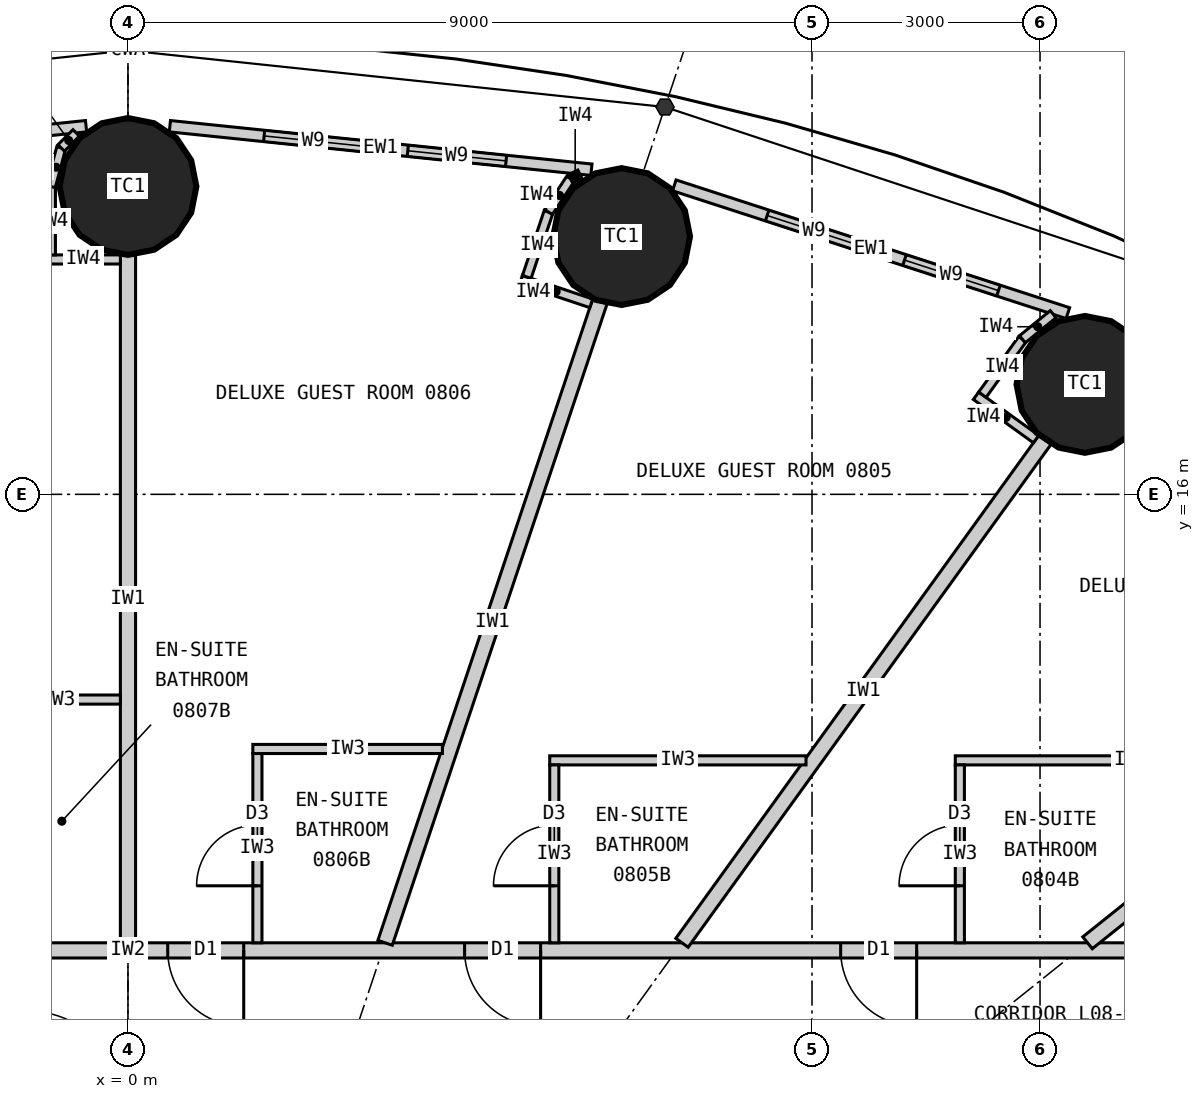
"""IFC4 building model, lengths in metres.
Left out: names, types, materials, properties, quantities, classifications, styles, units other than length and angle.
Written with IfcOpenShell. Run it as: python <this file> out.ifc"""

import sys

from ifc_helpers import new_model, si_unit, direction, frame, frame_2d, origin, origin_2d, place, context, subcontext, project, spatial, rectangle, circle, extrude, element, fill, save


model = new_model("IFC4")
c1 = context("Model", 3, precision=1e-05, world=origin(), true_north=direction((0.0, 1.0)))
c2 = subcontext(c1, "Body", "Model", "MODEL_VIEW")
j1 = project(units=[si_unit("LENGTHUNIT", "METRE"), si_unit("PLANEANGLEUNIT", "RADIAN")], contexts=[c1])
p1 = place(None, origin())
s1 = spatial("IfcSite", under=j1, at=p1, CompositionType="ELEMENT")
p2 = place(p1, origin())
s2 = spatial("IfcBuilding", under=s1, at=p2, CompositionType="ELEMENT")
p3 = place(p2, frame((0.0, 0.0, 39.3)))
s3 = spatial("IfcBuildingStorey", under=s2, at=p3, CompositionType="ELEMENT", Elevation=39.3)
for number, where, z_axis, x_axis in (
    (1, (12.591, 17.447, 0.0), (0.0, 0.0, 1.0), (1.0, 0.0, 0.0)),
    (2, (6.495, 19.391, 0.0), (0.0, 0.0, 1.0), (1.0, 0.0, 0.0)),
    (3, (0.0, 20.05, 0.0), (0.0, 0.0, 1.0), (1.0, 0.0, 0.0)),
):
    element("IfcColumn", number, at=place(p3, frame(where, z_axis=z_axis, x_axis=x_axis)), inside=s3, PredefinedType="COLUMN", context=c2, shape_type="SweptSolid", body=[
        extrude(circle(Radius=0.9, at=origin_2d()), origin(), (0.0, 0.0, 1.0), 3.3),
    ])
p4 = place(p3, frame((12.366, 18.384, 0.0), z_axis=(0.0, 0.0, 1.0), x_axis=(-0.951138486029, 0.308764603532, 0.0)))
e4 = element("IfcWall", 4, at=p4, inside=s3, PredefinedType="ELEMENTEDWALL", context=c2, shape_type="SweptSolid", body=[
    extrude(rectangle(XDim=5.444, YDim=0.15, at=frame_2d((2.722, 0.0))), origin(), (0.0, 0.0, 1.0), 3.12),
])
p5 = place(p4, frame((0.96, 0.0, 0.9)))
e5 = element("IfcOpeningElement", 5, at=p5, cuts=e4, PredefinedType="OPENING", context=c2, shape_type="SweptSolid", body=[
    extrude(rectangle(XDim=1.3, YDim=1.9, at=frame_2d((0.65, 0.95))), frame((0.0, 0.085, 0.0), z_axis=(0.0, -1.0, 0.0), x_axis=(1.0, 0.0, 0.0)), (0.0, 0.0, 1.0), 0.17),
])
p6 = place(p4, frame((2.86, 0.0, 0.9)))
e6 = element("IfcOpeningElement", 6, at=p6, cuts=e4, PredefinedType="OPENING", context=c2, shape_type="SweptSolid", body=[
    extrude(rectangle(XDim=1.3, YDim=1.9, at=frame_2d((0.65, 0.95))), frame((0.0, 0.085, 0.0), z_axis=(0.0, -1.0, 0.0), x_axis=(1.0, 0.0, 0.0)), (0.0, 0.0, 1.0), 0.17),
])
p7 = place(p3, frame((6.098, 20.271, 0.0), z_axis=(0.0, 0.0, 1.0), x_axis=(-0.994723735084, 0.102589915983, 0.0)))
e7 = element("IfcWall", 7, at=p7, inside=s3, PredefinedType="ELEMENTEDWALL", context=c2, shape_type="SweptSolid", body=[
    extrude(rectangle(XDim=5.576, YDim=0.15, at=frame_2d((2.788, 0.0))), origin(), (0.0, 0.0, 1.0), 3.12),
])
p8 = place(p7, frame((1.129, 0.0, 0.9)))
e8 = element("IfcOpeningElement", 8, at=p8, cuts=e7, PredefinedType="OPENING", context=c2, shape_type="SweptSolid", body=[
    extrude(rectangle(XDim=1.3, YDim=1.9, at=frame_2d((0.65, 0.95))), frame((0.0, 0.085, 0.0), z_axis=(0.0, -1.0, 0.0), x_axis=(1.0, 0.0, 0.0)), (0.0, 0.0, 1.0), 0.17),
])
p9 = place(p7, frame((3.029, 0.0, 0.9)))
e9 = element("IfcOpeningElement", 9, at=p9, cuts=e7, PredefinedType="OPENING", context=c2, shape_type="SweptSolid", body=[
    extrude(rectangle(XDim=1.3, YDim=1.9, at=frame_2d((0.65, 0.95))), frame((0.0, 0.085, 0.0), z_axis=(0.0, -1.0, 0.0), x_axis=(1.0, 0.0, 0.0)), (0.0, 0.0, 1.0), 0.17),
])
p10 = place(p3, frame((-0.551, 20.843, 0.0), z_axis=(0.0, 0.0, 1.0), x_axis=(-0.994723735084, -0.102589915983, 0.0)))
e10 = element("IfcWall", 10, at=p10, inside=s3, PredefinedType="ELEMENTEDWALL", context=c2, shape_type="SweptSolid", body=[
    extrude(rectangle(XDim=5.576, YDim=0.15, at=frame_2d((2.788, 0.0))), origin(), (0.0, 0.0, 1.0), 3.12),
])
p11 = place(p10, frame((1.247, 0.0, 0.9)))
e11 = element("IfcOpeningElement", 11, at=p11, cuts=e10, PredefinedType="OPENING", context=c2, shape_type="SweptSolid", body=[
    extrude(rectangle(XDim=1.3, YDim=1.9, at=frame_2d((0.65, 0.95))), frame((0.0, 0.085, 0.0), z_axis=(0.0, -1.0, 0.0), x_axis=(1.0, 0.0, 0.0)), (0.0, 0.0, 1.0), 0.17),
])
p12 = place(p10, frame((3.147, 0.0, 0.9)))
e12 = element("IfcOpeningElement", 12, at=p12, cuts=e10, PredefinedType="OPENING", context=c2, shape_type="SweptSolid", body=[
    extrude(rectangle(XDim=1.3, YDim=1.9, at=frame_2d((0.65, 0.95))), frame((0.0, 0.085, 0.0), z_axis=(0.0, -1.0, 0.0), x_axis=(1.0, 0.0, 0.0)), (0.0, 0.0, 1.0), 0.17),
])
p13 = place(p3, frame((-14.1, 10.0, 0.0), z_axis=(0.0, 0.0, 1.0), x_axis=(1.0, 0.0, 0.0)))
e13 = element("IfcWall", 13, at=p13, inside=s3, PredefinedType="PARTITIONING", context=c2, shape_type="SweptSolid", body=[
    extrude(rectangle(XDim=28.2, YDim=0.2, at=frame_2d((14.1, 0.0))), origin(), (0.0, 0.0, 1.0), 3.12),
])
p14 = place(p13, frame((23.477, 0.0, 0.0)))
e14 = element("IfcOpeningElement", 14, at=p14, cuts=e13, PredefinedType="OPENING", context=c2, shape_type="SweptSolid", body=[
    extrude(rectangle(XDim=1.0, YDim=2.2, at=frame_2d((0.5, 1.1))), frame((0.0, 0.11, 0.0), z_axis=(0.0, -1.0, 0.0), x_axis=(1.0, 0.0, 0.0)), (0.0, 0.0, 1.0), 0.22),
])
p15 = place(p13, frame((18.529, 0.0, 0.0)))
e15 = element("IfcOpeningElement", 15, at=p15, cuts=e13, PredefinedType="OPENING", context=c2, shape_type="SweptSolid", body=[
    extrude(rectangle(XDim=1.0, YDim=2.2, at=frame_2d((0.5, 1.1))), frame((0.0, 0.11, 0.0), z_axis=(0.0, -1.0, 0.0), x_axis=(1.0, 0.0, 0.0)), (0.0, 0.0, 1.0), 0.22),
])
p16 = place(p13, frame((14.623, 0.0, 0.0)))
e16 = element("IfcOpeningElement", 16, at=p16, cuts=e13, PredefinedType="OPENING", context=c2, shape_type="SweptSolid", body=[
    extrude(rectangle(XDim=1.0, YDim=2.2, at=frame_2d((0.5, 1.1))), frame((0.0, 0.11, 0.0), z_axis=(0.0, -1.0, 0.0), x_axis=(1.0, 0.0, 0.0)), (0.0, 0.0, 1.0), 0.22),
])
p17 = place(p13, frame((11.252, 0.0, 0.0)))
e17 = element("IfcOpeningElement", 17, at=p17, cuts=e13, PredefinedType="OPENING", context=c2, shape_type="SweptSolid", body=[
    extrude(rectangle(XDim=1.0, YDim=2.1, at=frame_2d((0.5, 1.05))), frame((0.0, 0.11, 0.0), z_axis=(0.0, -1.0, 0.0), x_axis=(1.0, 0.0, 0.0)), (0.0, 0.0, 1.0), 0.22),
])
p18 = place(p13, frame((8.671, 0.0, 0.0)))
e18 = element("IfcOpeningElement", 18, at=p18, cuts=e13, PredefinedType="OPENING", context=c2, shape_type="SweptSolid", body=[
    extrude(rectangle(XDim=1.0, YDim=2.2, at=frame_2d((0.5, 1.1))), frame((0.0, 0.11, 0.0), z_axis=(0.0, -1.0, 0.0), x_axis=(1.0, 0.0, 0.0)), (0.0, 0.0, 1.0), 0.22),
])
p19 = place(p13, frame((1.616, 0.0, 0.0)))
e19 = element("IfcOpeningElement", 19, at=p19, cuts=e13, PredefinedType="OPENING", context=c2, shape_type="SweptSolid", body=[
    extrude(rectangle(XDim=1.0, YDim=2.2, at=frame_2d((0.5, 1.1))), frame((0.0, 0.11, 0.0), z_axis=(0.0, -1.0, 0.0), x_axis=(1.0, 0.0, 0.0)), (0.0, 0.0, 1.0), 0.22),
])
p20 = place(p3, frame((12.625, 10.1, 0.0), z_axis=(0.0, 0.0, 1.0), x_axis=(0.780872884676, 0.624689953479, 0.0)))
e20 = element("IfcWall", 20, at=p20, inside=s3, PredefinedType="PARTITIONING", context=c2, shape_type="SweptSolid", body=[
    extrude(rectangle(XDim=5.845, YDim=0.2, at=frame_2d((2.922, 0.0))), origin(), (0.0, 0.0, 1.0), 2.32),
])
p21 = place(p3, frame((7.289, 10.1, 0.0), z_axis=(0.0, 0.0, 1.0), x_axis=(0.585216319319, 0.810877216108, 0.0)))
e21 = element("IfcWall", 21, at=p21, inside=s3, PredefinedType="PARTITIONING", context=c2, shape_type="SweptSolid", body=[
    extrude(rectangle(XDim=8.16, YDim=0.2, at=frame_2d((4.08, 0.0))), origin(), (0.0, 0.0, 1.0), 2.32),
])
p22 = place(p3, frame((3.383, 10.1, 0.0), z_axis=(0.0, 0.0, 1.0), x_axis=(0.317593727596, 0.948226884344, 0.0)))
e22 = element("IfcWall", 22, at=p22, inside=s3, PredefinedType="PARTITIONING", context=c2, shape_type="SweptSolid", body=[
    extrude(rectangle(XDim=8.899, YDim=0.2, at=frame_2d((4.449, 0.0))), origin(), (0.0, 0.0, 1.0), 2.32),
])
p23 = place(p3, frame((0.0, 10.1, 0.0), z_axis=(0.0, 0.0, 1.0), x_axis=(0.0, 1.0, 0.0)))
e23 = element("IfcWall", 23, at=p23, inside=s3, PredefinedType="PARTITIONING", context=c2, shape_type="SweptSolid", body=[
    extrude(rectangle(XDim=9.05, YDim=0.2, at=frame_2d((4.525, 0.0))), origin(), (0.0, 0.0, 1.0), 2.32),
])
p24 = place(p3, frame((15.525, 12.5, 0.0), z_axis=(0.0, 0.0, 1.0), x_axis=(-1.0, 0.0, 0.0)))
e24 = element("IfcWall", 24, at=p24, inside=s3, PredefinedType="PARTITIONING", context=c2, shape_type="SweptSolid", body=[
    extrude(rectangle(XDim=4.64, YDim=0.12, at=frame_2d((2.32, 0.0))), origin(), (0.0, 0.0, 1.0), 3.12),
])
p25 = place(p3, frame((10.945, 10.1, 0.0), z_axis=(0.0, 0.0, 1.0), x_axis=(0.0, 1.0, 0.0)))
e25 = element("IfcWall", 25, at=p25, inside=s3, PredefinedType="PARTITIONING", context=c2, shape_type="SweptSolid", body=[
    extrude(rectangle(XDim=2.34, YDim=0.12, at=frame_2d((1.17, 0.0))), origin(), (0.0, 0.0, 1.0), 3.12),
])
p26 = place(p25, frame((0.75, 0.0, 0.0)))
e26 = element("IfcOpeningElement", 26, at=p26, cuts=e25, PredefinedType="OPENING", context=c2, shape_type="SweptSolid", body=[
    extrude(rectangle(XDim=0.8, YDim=2.1, at=frame_2d((0.4, 1.05))), frame((0.0, 0.07, 0.0), z_axis=(0.0, -1.0, 0.0), x_axis=(1.0, 0.0, 0.0)), (0.0, 0.0, 1.0), 0.14),
])
p27 = place(p3, frame((8.921, 12.5, 0.0), z_axis=(0.0, 0.0, 1.0), x_axis=(-1.0, 0.0, 0.0)))
e27 = element("IfcWall", 27, at=p27, inside=s3, PredefinedType="PARTITIONING", context=c2, shape_type="SweptSolid", body=[
    extrude(rectangle(XDim=3.372, YDim=0.12, at=frame_2d((1.686, 0.0))), origin(), (0.0, 0.0, 1.0), 3.12),
])
p28 = place(p3, frame((5.609, 10.1, 0.0), z_axis=(0.0, 0.0, 1.0), x_axis=(0.0, 1.0, 0.0)))
e28 = element("IfcWall", 28, at=p28, inside=s3, PredefinedType="PARTITIONING", context=c2, shape_type="SweptSolid", body=[
    extrude(rectangle(XDim=2.34, YDim=0.12, at=frame_2d((1.17, 0.0))), origin(), (0.0, 0.0, 1.0), 3.12),
])
p29 = place(p28, frame((0.75, 0.0, 0.0)))
e29 = element("IfcOpeningElement", 29, at=p29, cuts=e28, PredefinedType="OPENING", context=c2, shape_type="SweptSolid", body=[
    extrude(rectangle(XDim=0.8, YDim=2.1, at=frame_2d((0.4, 1.05))), frame((0.0, 0.07, 0.0), z_axis=(0.0, -1.0, 0.0), x_axis=(1.0, 0.0, 0.0)), (0.0, 0.0, 1.0), 0.14),
])
p30 = place(p3, frame((4.137, 12.65, 0.0), z_axis=(0.0, 0.0, 1.0), x_axis=(-1.0, 0.0, 0.0)))
e30 = element("IfcWall", 30, at=p30, inside=s3, PredefinedType="PARTITIONING", context=c2, shape_type="SweptSolid", body=[
    extrude(rectangle(XDim=2.494, YDim=0.12, at=frame_2d((1.247, 0.0))), origin(), (0.0, 0.0, 1.0), 3.12),
])
p31 = place(p3, frame((1.703, 10.1, 0.0), z_axis=(0.0, 0.0, 1.0), x_axis=(0.0, 1.0, 0.0)))
e31 = element("IfcWall", 31, at=p31, inside=s3, PredefinedType="PARTITIONING", context=c2, shape_type="SweptSolid", body=[
    extrude(rectangle(XDim=2.49, YDim=0.12, at=frame_2d((1.245, 0.0))), origin(), (0.0, 0.0, 1.0), 3.12),
])
p32 = place(p31, frame((0.75, 0.0, 0.0)))
e32 = element("IfcOpeningElement", 32, at=p32, cuts=e31, PredefinedType="OPENING", context=c2, shape_type="SweptSolid", body=[
    extrude(rectangle(XDim=0.8, YDim=2.1, at=frame_2d((0.4, 1.05))), frame((0.0, 0.07, 0.0), z_axis=(0.0, -1.0, 0.0), x_axis=(1.0, 0.0, 0.0)), (0.0, 0.0, 1.0), 0.14),
])
p33 = place(p3, frame((-0.1, 13.3, 0.0), z_axis=(0.0, 0.0, 1.0), x_axis=(-1.0, 0.0, 0.0)))
e33 = element("IfcWall", 33, at=p33, inside=s3, PredefinedType="PARTITIONING", context=c2, shape_type="SweptSolid", body=[
    extrude(rectangle(XDim=1.64, YDim=0.12, at=frame_2d((0.82, 0.0))), origin(), (0.0, 0.0, 1.0), 3.12),
])
p34 = place(p3, frame((11.948, 16.727, 0.0), z_axis=(0.0, 0.0, 1.0), x_axis=(-0.810897160646, 0.585188683123, 0.0)))
e34 = element("IfcWall", 34, at=p34, inside=s3, PredefinedType="PARTITIONING", context=c2, shape_type="SweptSolid", body=[
    extrude(rectangle(XDim=0.975, YDim=0.12, at=frame_2d((0.487, 0.0))), origin(), (0.0, 0.0, 1.0), 3.12),
])
p35 = place(p3, frame((11.241, 17.31, 0.0), z_axis=(0.0, 0.0, 1.0), x_axis=(0.585054732094, 0.810993810367, 0.0)))
e35 = element("IfcWall", 35, at=p35, inside=s3, PredefinedType="PARTITIONING", context=c2, shape_type="SweptSolid", body=[
    extrude(rectangle(XDim=0.9, YDim=0.12, at=frame_2d((0.45, 0.0))), origin(), (0.0, 0.0, 1.0), 3.12),
])
p36 = place(p3, frame((11.768, 18.04, 0.0), z_axis=(0.0, 0.0, 1.0), x_axis=(0.775268927517, 0.631631292787, 0.0)))
e36 = element("IfcWall", 36, at=p36, inside=s3, PredefinedType="PARTITIONING", context=c2, shape_type="SweptSolid", body=[
    extrude(rectangle(XDim=0.522, YDim=0.12, at=frame_2d((0.261, 0.0))), origin(), (0.0, 0.0, 1.0), 3.12),
])
p37 = place(p3, frame((6.095, 18.513, 0.0), z_axis=(0.0, 0.0, 1.0), x_axis=(-0.948281677008, 0.317430088446, 0.0)))
e37 = element("IfcWall", 37, at=p37, inside=s3, PredefinedType="PARTITIONING", context=c2, shape_type="SweptSolid", body=[
    extrude(rectangle(XDim=0.974, YDim=0.12, at=frame_2d((0.487, 0.0))), origin(), (0.0, 0.0, 1.0), 3.12),
])
p38 = place(p3, frame((5.247, 18.86, 0.0), z_axis=(0.0, 0.0, 1.0), x_axis=(0.317610704489, 0.94822119803, 0.0)))
e38 = element("IfcWall", 38, at=p38, inside=s3, PredefinedType="PARTITIONING", context=c2, shape_type="SweptSolid", body=[
    extrude(rectangle(XDim=0.9, YDim=0.12, at=frame_2d((0.45, 0.0))), origin(), (0.0, 0.0, 1.0), 3.12),
])
p39 = place(p3, frame((5.533, 19.714, 0.0), z_axis=(0.0, 0.0, 1.0), x_axis=(0.552014331743, 0.833834622422, 0.0)))
e39 = element("IfcWall", 39, at=p39, inside=s3, PredefinedType="PARTITIONING", context=c2, shape_type="SweptSolid", body=[
    extrude(rectangle(XDim=0.525, YDim=0.12, at=frame_2d((0.262, 0.0))), origin(), (0.0, 0.0, 1.0), 3.12),
])
p40 = place(p3, frame((5.823, 20.151, 0.0), z_axis=(0.0, 0.0, 1.0), x_axis=(0.894784104941, 0.446499054362, 0.0)))
e40 = element("IfcWall", 40, at=p40, inside=s3, PredefinedType="PARTITIONING", context=c2, shape_type="SweptSolid", body=[
    extrude(rectangle(XDim=0.137, YDim=0.12, at=frame_2d((0.068, 0.0))), origin(), (0.0, 0.0, 1.0), 3.12),
])
p41 = place(p3, frame((-0.1, 19.09, 0.0), z_axis=(0.0, 0.0, 1.0), x_axis=(-1.0, 0.0, 0.0)))
e41 = element("IfcWall", 41, at=p41, inside=s3, PredefinedType="PARTITIONING", context=c2, shape_type="SweptSolid", body=[
    extrude(rectangle(XDim=0.974, YDim=0.12, at=frame_2d((0.487, 0.0))), origin(), (0.0, 0.0, 1.0), 3.12),
])
p42 = place(p3, frame((-1.015, 19.15, 0.0), z_axis=(0.0, 0.0, 1.0), x_axis=(0.0, 1.0, 0.0)))
e42 = element("IfcWall", 42, at=p42, inside=s3, PredefinedType="PARTITIONING", context=c2, shape_type="SweptSolid", body=[
    extrude(rectangle(XDim=0.9, YDim=0.12, at=frame_2d((0.45, 0.0))), origin(), (0.0, 0.0, 1.0), 3.12),
])
p43 = place(p3, frame((-1.015, 20.05, 0.0), z_axis=(0.0, 0.0, 1.0), x_axis=(0.258906465625, 0.96590239779, 0.0)))
e43 = element("IfcWall", 43, at=p43, inside=s3, PredefinedType="PARTITIONING", context=c2, shape_type="SweptSolid", body=[
    extrude(rectangle(XDim=0.525, YDim=0.12, at=frame_2d((0.263, 0.0))), origin(), (0.0, 0.0, 1.0), 3.12),
])
p44 = place(p3, frame((-0.879, 20.557, 0.0), z_axis=(0.0, 0.0, 1.0), x_axis=(0.707106781187, 0.707106781187, 0.0)))
e44 = element("IfcWall", 44, at=p44, inside=s3, PredefinedType="PARTITIONING", context=c2, shape_type="SweptSolid", body=[
    extrude(rectangle(XDim=0.279, YDim=0.12, at=frame_2d((0.14, 0.0))), origin(), (0.0, 0.0, 1.0), 3.12),
])
p45 = place(p5, origin())
e45 = element("IfcWindow", 45, at=p45, inside=s3, PartitioningType="SINGLE_PANEL", PredefinedType="WINDOW", context=c2, shape_type="SweptSolid", body=[
    extrude(rectangle(XDim=1.3, YDim=1.9, at=frame_2d((0.65, 0.95))), frame((0.0, 0.03, 0.0), z_axis=(0.0, -1.0, 0.0), x_axis=(1.0, 0.0, 0.0)), (0.0, 0.0, 1.0), 0.06),
])
fill(e5, e45)
p46 = place(p6, origin())
e46 = element("IfcWindow", 46, at=p46, inside=s3, PartitioningType="SINGLE_PANEL", PredefinedType="WINDOW", context=c2, shape_type="SweptSolid", body=[
    extrude(rectangle(XDim=1.3, YDim=1.9, at=frame_2d((0.65, 0.95))), frame((0.0, 0.03, 0.0), z_axis=(0.0, -1.0, 0.0), x_axis=(1.0, 0.0, 0.0)), (0.0, 0.0, 1.0), 0.06),
])
fill(e6, e46)
p47 = place(p8, origin())
e47 = element("IfcWindow", 47, at=p47, inside=s3, PartitioningType="SINGLE_PANEL", PredefinedType="WINDOW", context=c2, shape_type="SweptSolid", body=[
    extrude(rectangle(XDim=1.3, YDim=1.9, at=frame_2d((0.65, 0.95))), frame((0.0, 0.03, 0.0), z_axis=(0.0, -1.0, 0.0), x_axis=(1.0, 0.0, 0.0)), (0.0, 0.0, 1.0), 0.06),
])
fill(e8, e47)
p48 = place(p9, origin())
e48 = element("IfcWindow", 48, at=p48, inside=s3, PartitioningType="SINGLE_PANEL", PredefinedType="WINDOW", context=c2, shape_type="SweptSolid", body=[
    extrude(rectangle(XDim=1.3, YDim=1.9, at=frame_2d((0.65, 0.95))), frame((0.0, 0.03, 0.0), z_axis=(0.0, -1.0, 0.0), x_axis=(1.0, 0.0, 0.0)), (0.0, 0.0, 1.0), 0.06),
])
fill(e9, e48)
p49 = place(p26, origin())
e49 = element("IfcDoor", 49, at=p49, inside=s3, OperationType="SINGLE_SWING_LEFT", PredefinedType="DOOR", context=c2, shape_type="SweptSolid", body=[
    extrude(rectangle(XDim=0.8, YDim=2.1, at=frame_2d((0.4, 1.05))), frame((0.0, 0.025, 0.0), z_axis=(0.0, -1.0, 0.0), x_axis=(1.0, 0.0, 0.0)), (0.0, 0.0, 1.0), 0.05),
])
fill(e26, e49)
p50 = place(p14, origin())
e50 = element("IfcDoor", 50, at=p50, inside=s3, OperationType="SINGLE_SWING_RIGHT", PredefinedType="DOOR", context=c2, shape_type="SweptSolid", body=[
    extrude(rectangle(XDim=1.0, YDim=2.2, at=frame_2d((0.5, 1.1))), frame((0.0, 0.025, 0.0), z_axis=(0.0, -1.0, 0.0), x_axis=(1.0, 0.0, 0.0)), (0.0, 0.0, 1.0), 0.05),
])
fill(e14, e50)
p51 = place(p29, origin())
e51 = element("IfcDoor", 51, at=p51, inside=s3, OperationType="SINGLE_SWING_LEFT", PredefinedType="DOOR", context=c2, shape_type="SweptSolid", body=[
    extrude(rectangle(XDim=0.8, YDim=2.1, at=frame_2d((0.4, 1.05))), frame((0.0, 0.025, 0.0), z_axis=(0.0, -1.0, 0.0), x_axis=(1.0, 0.0, 0.0)), (0.0, 0.0, 1.0), 0.05),
])
fill(e29, e51)
p52 = place(p15, origin())
e52 = element("IfcDoor", 52, at=p52, inside=s3, OperationType="SINGLE_SWING_RIGHT", PredefinedType="DOOR", context=c2, shape_type="SweptSolid", body=[
    extrude(rectangle(XDim=1.0, YDim=2.2, at=frame_2d((0.5, 1.1))), frame((0.0, 0.025, 0.0), z_axis=(0.0, -1.0, 0.0), x_axis=(1.0, 0.0, 0.0)), (0.0, 0.0, 1.0), 0.05),
])
fill(e15, e52)
p53 = place(p32, origin())
e53 = element("IfcDoor", 53, at=p53, inside=s3, OperationType="SINGLE_SWING_LEFT", PredefinedType="DOOR", context=c2, shape_type="SweptSolid", body=[
    extrude(rectangle(XDim=0.8, YDim=2.1, at=frame_2d((0.4, 1.05))), frame((0.0, 0.025, 0.0), z_axis=(0.0, -1.0, 0.0), x_axis=(1.0, 0.0, 0.0)), (0.0, 0.0, 1.0), 0.05),
])
fill(e32, e53)
p54 = place(p16, origin())
e54 = element("IfcDoor", 54, at=p54, inside=s3, OperationType="SINGLE_SWING_RIGHT", PredefinedType="DOOR", context=c2, shape_type="SweptSolid", body=[
    extrude(rectangle(XDim=1.0, YDim=2.2, at=frame_2d((0.5, 1.1))), frame((0.0, 0.025, 0.0), z_axis=(0.0, -1.0, 0.0), x_axis=(1.0, 0.0, 0.0)), (0.0, 0.0, 1.0), 0.05),
])
fill(e16, e54)
save(model, sys.argv[1])
